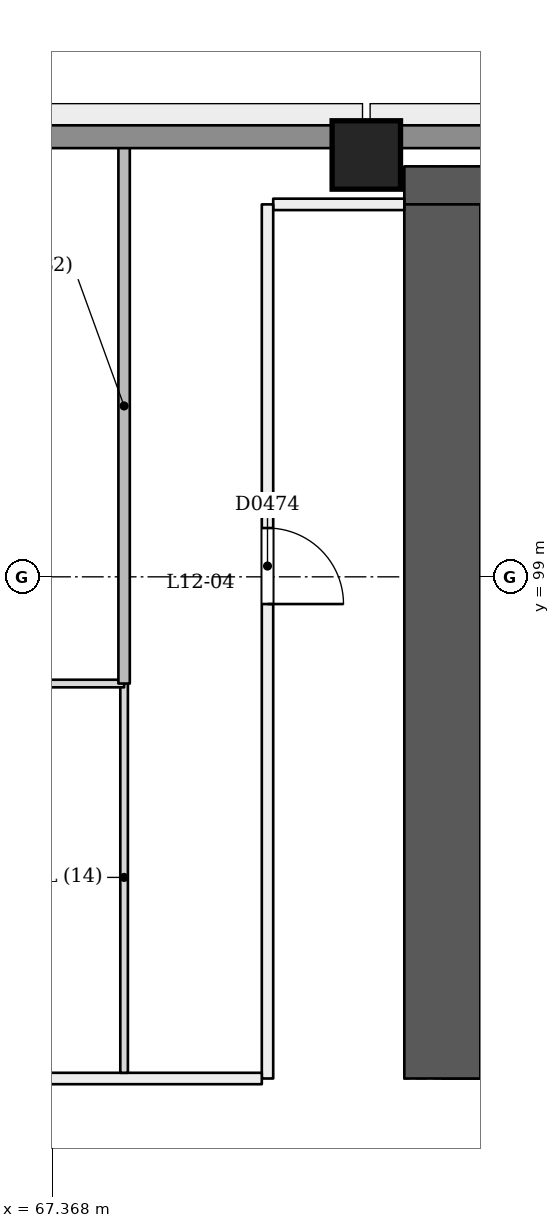
"""IFC4 building model, lengths in metres.
Left out: names, types, materials, properties, quantities, classifications, styles, units other than length and angle.
Written with IfcOpenShell. Run it as: python <this file> out.ifc"""

import sys

from ifc_helpers import new_model, si_unit, direction, frame, frame_2d, origin, origin_2d, place, context, subcontext, project, spatial, rectangle, extrude, element, fill, save


model = new_model("IFC4")
c1 = context("Model", 3, precision=1e-05, world=origin(), true_north=direction((0.0, 1.0)))
c2 = subcontext(c1, "Body", "Model", "MODEL_VIEW")
j1 = project(units=[si_unit("LENGTHUNIT", "METRE"), si_unit("PLANEANGLEUNIT", "RADIAN")], contexts=[c1])
p1 = place(None, origin())
s1 = spatial("IfcSite", under=j1, at=p1, CompositionType="ELEMENT")
p2 = place(p1, origin())
s2 = spatial("IfcBuilding", under=s1, at=p2, CompositionType="ELEMENT")
p3 = place(p2, frame((0.0, 0.0, 52.2)))
s3 = spatial("IfcBuildingStorey", under=s2, at=p3, CompositionType="ELEMENT", Elevation=52.2)
p4 = place(p3, frame((72.5, 92.9, 0.0), z_axis=(0.0, 0.0, 1.0), x_axis=(1.0, 0.0, 0.0)))
e1 = element("IfcWall", 1, at=p4, inside=s3, PredefinedType="SHEAR", context=c2, shape_type="SweptSolid", body=[
    extrude(rectangle(XDim=25.5, YDim=1.0, at=frame_2d((12.75, 0.0))), origin(), (0.0, 0.0, 1.0), 3.6),
])
p5 = place(p4, frame((1.3, 0.0, 0.0)))
e2 = element("IfcOpeningElement", 2, at=p5, cuts=e1, PredefinedType="OPENING", context=c2, shape_type="SweptSolid", body=[
    extrude(rectangle(XDim=1.2, YDim=2.1, at=frame_2d((0.6, 1.05))), frame((0.0, 0.51, 0.0), z_axis=(0.0, -1.0, 0.0), x_axis=(1.0, 0.0, 0.0)), (0.0, 0.0, 1.0), 1.021),
])
p6 = place(p4, frame((3.5, 0.0, 0.0)))
e3 = element("IfcOpeningElement", 3, at=p6, cuts=e1, PredefinedType="OPENING", context=c2, shape_type="SweptSolid", body=[
    extrude(rectangle(XDim=1.2, YDim=2.1, at=frame_2d((0.6, 1.05))), frame((0.0, 0.51, 0.0), z_axis=(0.0, -1.0, 0.0), x_axis=(1.0, 0.0, 0.0)), (0.0, 0.0, 1.0), 1.021),
])
p7 = place(p4, frame((13.5, 0.0, 0.0)))
e4 = element("IfcOpeningElement", 4, at=p7, cuts=e1, PredefinedType="OPENING", context=c2, shape_type="SweptSolid", body=[
    extrude(rectangle(XDim=1.2, YDim=2.1, at=frame_2d((0.6, 1.05))), frame((0.0, 0.51, 0.0), z_axis=(0.0, -1.0, 0.0), x_axis=(1.0, 0.0, 0.0)), (0.0, 0.0, 1.0), 1.021),
])
p8 = place(p4, frame((15.462, 0.0, 0.0)))
e5 = element("IfcOpeningElement", 5, at=p8, cuts=e1, PredefinedType="OPENING", context=c2, shape_type="SweptSolid", body=[
    extrude(rectangle(XDim=1.0, YDim=2.1, at=frame_2d((0.5, 1.05))), frame((0.0, 0.51, 0.0), z_axis=(0.0, -1.0, 0.0), x_axis=(1.0, 0.0, 0.0)), (0.0, 0.0, 1.0), 1.021),
])
p9 = place(p4, frame((18.3, 0.0, 0.0)))
e6 = element("IfcOpeningElement", 6, at=p9, cuts=e1, PredefinedType="OPENING", context=c2, shape_type="SweptSolid", body=[
    extrude(rectangle(XDim=1.0, YDim=2.1, at=frame_2d((0.5, 1.05))), frame((0.0, 0.51, 0.0), z_axis=(0.0, -1.0, 0.0), x_axis=(1.0, 0.0, 0.0)), (0.0, 0.0, 1.0), 1.021),
])
p10 = place(p4, frame((21.2, 0.0, 0.0)))
e7 = element("IfcOpeningElement", 7, at=p10, cuts=e1, PredefinedType="OPENING", context=c2, shape_type="SweptSolid", body=[
    extrude(rectangle(XDim=1.0, YDim=2.1, at=frame_2d((0.5, 1.05))), frame((0.0, 0.51, 0.0), z_axis=(0.0, -1.0, 0.0), x_axis=(1.0, 0.0, 0.0)), (0.0, 0.0, 1.0), 1.021),
])
p11 = place(p4, frame((23.087, 0.0, 0.0)))
e8 = element("IfcOpeningElement", 8, at=p11, cuts=e1, PredefinedType="OPENING", context=c2, shape_type="SweptSolid", body=[
    extrude(rectangle(XDim=1.0, YDim=2.1, at=frame_2d((0.5, 1.05))), frame((0.0, 0.51, 0.0), z_axis=(0.0, -1.0, 0.0), x_axis=(1.0, 0.0, 0.0)), (0.0, 0.0, 1.0), 1.021),
])
p12 = place(p3, frame((97.5, 103.9, 0.0), z_axis=(0.0, 0.0, 1.0), x_axis=(-1.0, 0.0, 0.0)))
e9 = element("IfcWall", 9, at=p12, inside=s3, PredefinedType="SHEAR", context=c2, shape_type="SweptSolid", body=[
    extrude(rectangle(XDim=25.5, YDim=1.0, at=frame_2d((12.75, 0.0))), origin(), (0.0, 0.0, 1.0), 3.6),
])
p13 = place(p3, frame((72.5, 103.9, 0.0), z_axis=(0.0, 0.0, 1.0), x_axis=(0.0, -1.0, 0.0)))
e10 = element("IfcWall", 10, at=p13, inside=s3, PredefinedType="SHEAR", context=c2, shape_type="SweptSolid", body=[
    extrude(rectangle(XDim=11.5, YDim=1.0, at=frame_2d((5.75, 0.0))), origin(), (0.0, 0.0, 1.0), 3.6),
])
p14 = place(p3, frame((71.5, 104.55, 0.0), z_axis=(0.0, 0.0, 1.0), x_axis=(1.0, 0.0, 0.0)))
e11 = element("IfcColumn", 11, at=p14, inside=s3, PredefinedType="COLUMN", context=c2, shape_type="SweptSolid", body=[
    extrude(rectangle(XDim=0.9, YDim=0.9, at=origin_2d()), origin(), (0.0, 0.0, 1.0), 3.6),
])
p15 = place(p3, frame((72.0, 103.9, 0.0), z_axis=(0.0, 0.0, 1.0), x_axis=(-1.0, 0.0, 0.0)))
e12 = element("IfcWall", 12, at=p15, inside=s3, PredefinedType="PARTITIONING", context=c2, shape_type="SweptSolid", body=[
    extrude(rectangle(XDim=1.725, YDim=0.15, at=frame_2d((0.863, 0.0))), origin(), (0.0, 0.0, 1.0), 2.6),
])
p16 = place(p3, frame((70.2, 103.9, 0.0), z_axis=(0.0, 0.0, 1.0), x_axis=(0.0, -1.0, 0.0)))
e13 = element("IfcWall", 13, at=p16, inside=s3, PredefinedType="PARTITIONING", context=c2, shape_type="SweptSolid", body=[
    extrude(rectangle(XDim=11.5, YDim=0.15, at=frame_2d((5.75, 0.0))), origin(), (0.0, 0.0, 1.0), 2.6),
])
p17 = place(p16, frame((4.258, 0.0, 0.0)))
e14 = element("IfcOpeningElement", 14, at=p17, cuts=e13, PredefinedType="OPENING", context=c2, shape_type="SweptSolid", body=[
    extrude(rectangle(XDim=1.0, YDim=2.1, at=frame_2d((0.5, 1.05))), frame((0.0, 0.085, 0.0), z_axis=(0.0, -1.0, 0.0), x_axis=(1.0, 0.0, 0.0)), (0.0, 0.0, 1.0), 0.171),
])
p18 = place(p3, frame((70.125, 92.4, 0.0), z_axis=(0.0, 0.0, 1.0), x_axis=(-1.0, 0.0, 0.0)))
e15 = element("IfcWall", 15, at=p18, inside=s3, PredefinedType="PARTITIONING", context=c2, shape_type="SweptSolid", body=[
    extrude(rectangle(XDim=3.52, YDim=0.15, at=frame_2d((1.76, 0.0))), origin(), (0.0, 0.0, 1.0), 3.1),
])
p19 = place(p3, frame((64.002, 93.308, 0.0), z_axis=(0.0, 0.0, 1.0), x_axis=(0.49999948646, -0.866025700277, 0.0)))
e16 = element("IfcWall", 16, at=p19, inside=s3, PredefinedType="PARTITIONING", context=c2, shape_type="SweptSolid", body=[
    extrude(rectangle(XDim=38.6, YDim=0.15, at=frame_2d((19.3, 0.0))), origin(), (0.0, 0.0, 1.0), 2.7),
])
p20 = place(p19, frame((0.605, 0.0, 0.0)))
e17 = element("IfcOpeningElement", 17, at=p20, cuts=e16, PredefinedType="OPENING", context=c2, shape_type="SweptSolid", body=[
    extrude(rectangle(XDim=1.0, YDim=2.1, at=frame_2d((0.5, 1.05))), frame((0.0, 0.085, 0.0), z_axis=(0.0, -1.0, 0.0), x_axis=(1.0, 0.0, 0.0)), (0.0, 0.0, 1.0), 0.171),
])
p21 = place(p19, frame((7.28, 0.0, 0.0)))
e18 = element("IfcOpeningElement", 18, at=p21, cuts=e16, PredefinedType="OPENING", context=c2, shape_type="SweptSolid", body=[
    extrude(rectangle(XDim=1.0, YDim=2.1, at=frame_2d((0.5, 1.05))), frame((0.0, 0.085, 0.0), z_axis=(0.0, -1.0, 0.0), x_axis=(1.0, 0.0, 0.0)), (0.0, 0.0, 1.0), 0.171),
])
p22 = place(p19, frame((9.72, 0.0, 0.0)))
e19 = element("IfcOpeningElement", 19, at=p22, cuts=e16, PredefinedType="OPENING", context=c2, shape_type="SweptSolid", body=[
    extrude(rectangle(XDim=1.0, YDim=2.1, at=frame_2d((0.5, 1.05))), frame((0.0, 0.085, 0.0), z_axis=(0.0, -1.0, 0.0), x_axis=(1.0, 0.0, 0.0)), (0.0, 0.0, 1.0), 0.171),
])
p23 = place(p19, frame((16.395, 0.0, 0.0)))
e20 = element("IfcOpeningElement", 20, at=p23, cuts=e16, PredefinedType="OPENING", context=c2, shape_type="SweptSolid", body=[
    extrude(rectangle(XDim=1.0, YDim=2.1, at=frame_2d((0.5, 1.05))), frame((0.0, 0.085, 0.0), z_axis=(0.0, -1.0, 0.0), x_axis=(1.0, 0.0, 0.0)), (0.0, 0.0, 1.0), 0.171),
])
p24 = place(p19, frame((18.72, 0.0, 0.0)))
e21 = element("IfcOpeningElement", 21, at=p24, cuts=e16, PredefinedType="OPENING", context=c2, shape_type="SweptSolid", body=[
    extrude(rectangle(XDim=1.0, YDim=2.1, at=frame_2d((0.5, 1.05))), frame((0.0, 0.085, 0.0), z_axis=(0.0, -1.0, 0.0), x_axis=(1.0, 0.0, 0.0)), (0.0, 0.0, 1.0), 0.171),
])
p25 = place(p19, frame((25.395, 0.0, 0.0)))
e22 = element("IfcOpeningElement", 22, at=p25, cuts=e16, PredefinedType="OPENING", context=c2, shape_type="SweptSolid", body=[
    extrude(rectangle(XDim=1.0, YDim=2.1, at=frame_2d((0.5, 1.05))), frame((0.0, 0.085, 0.0), z_axis=(0.0, -1.0, 0.0), x_axis=(1.0, 0.0, 0.0)), (0.0, 0.0, 1.0), 0.171),
])
p26 = place(p19, frame((27.605, 0.0, 0.0)))
e23 = element("IfcOpeningElement", 23, at=p26, cuts=e16, PredefinedType="OPENING", context=c2, shape_type="SweptSolid", body=[
    extrude(rectangle(XDim=1.0, YDim=2.1, at=frame_2d((0.5, 1.05))), frame((0.0, 0.085, 0.0), z_axis=(0.0, -1.0, 0.0), x_axis=(1.0, 0.0, 0.0)), (0.0, 0.0, 1.0), 0.171),
])
p27 = place(p19, frame((34.28, 0.0, 0.0)))
e24 = element("IfcOpeningElement", 24, at=p27, cuts=e16, PredefinedType="OPENING", context=c2, shape_type="SweptSolid", body=[
    extrude(rectangle(XDim=1.0, YDim=2.1, at=frame_2d((0.5, 1.05))), frame((0.0, 0.085, 0.0), z_axis=(0.0, -1.0, 0.0), x_axis=(1.0, 0.0, 0.0)), (0.0, 0.0, 1.0), 0.171),
])
p28 = place(p19, frame((37.324, 0.0, 0.0)))
e25 = element("IfcOpeningElement", 25, at=p28, cuts=e16, PredefinedType="OPENING", context=c2, shape_type="SweptSolid", body=[
    extrude(rectangle(XDim=1.0, YDim=2.1, at=frame_2d((0.5, 1.05))), frame((0.0, 0.085, 0.0), z_axis=(0.0, -1.0, 0.0), x_axis=(1.0, 0.0, 0.0)), (0.0, 0.0, 1.0), 0.171),
])
p29 = place(p3, frame((68.313, 92.475, 0.0), z_axis=(0.0, 0.0, 1.0), x_axis=(0.0, 1.0, 0.0)))
e26 = element("IfcWall", 26, at=p29, inside=s3, PredefinedType="PARTITIONING", context=c2, shape_type="SweptSolid", body=[
    extrude(rectangle(XDim=5.141, YDim=0.1, at=frame_2d((2.571, 0.0))), origin(), (0.0, 0.0, 1.0), 3.1),
])
p30 = place(p3, frame((68.313, 97.596, 0.0), z_axis=(0.0, 0.0, 1.0), x_axis=(-1.0, 0.0, 0.0)))
e27 = element("IfcWall", 27, at=p30, inside=s3, PredefinedType="PARTITIONING", context=c2, shape_type="SweptSolid", body=[
    extrude(rectangle(XDim=1.833, YDim=0.1, at=frame_2d((0.917, 0.0))), origin(), (0.0, 0.0, 1.0), 3.1),
])
p31 = place(p3, frame((68.313, 104.9, 0.0), z_axis=(0.0, 0.0, 1.0), x_axis=(0.0, -1.0, 0.0)))
e28 = element("IfcWall", 28, at=p31, inside=s3, PredefinedType="PARTITIONING", context=c2, shape_type="SweptSolid", body=[
    extrude(rectangle(XDim=7.304, YDim=0.15, at=frame_2d((3.652, 0.0))), origin(), (0.0, 0.0, 1.0), 2.6),
])
p32 = place(p3, frame((59.208, 104.79, 0.0), z_axis=(0.0, 0.0, 1.0), x_axis=(1.0, 0.0, 0.0)))
e29 = element("IfcWall", 29, at=p32, inside=s3, PredefinedType="SOLIDWALL", context=c2, shape_type="SweptSolid", body=[
    extrude(rectangle(XDim=51.584, YDim=0.3, at=frame_2d((25.792, 0.0))), origin(), (0.0, 0.0, 1.0), 2.6),
])
p33 = place(p17, origin())
e30 = element("IfcDoor", 30, at=p33, inside=s3, OperationType="SINGLE_SWING_RIGHT", PredefinedType="NOTDEFINED", context=c2, shape_type="SweptSolid", body=[
    extrude(rectangle(XDim=1.0, YDim=2.1, at=frame_2d((0.5, 1.05))), frame((0.0, 0.025, 0.0), z_axis=(0.0, -1.0, 0.0), x_axis=(1.0, 0.0, 0.0)), (0.0, 0.0, 1.0), 0.05),
])
fill(e14, e30)
save(model, sys.argv[1])
